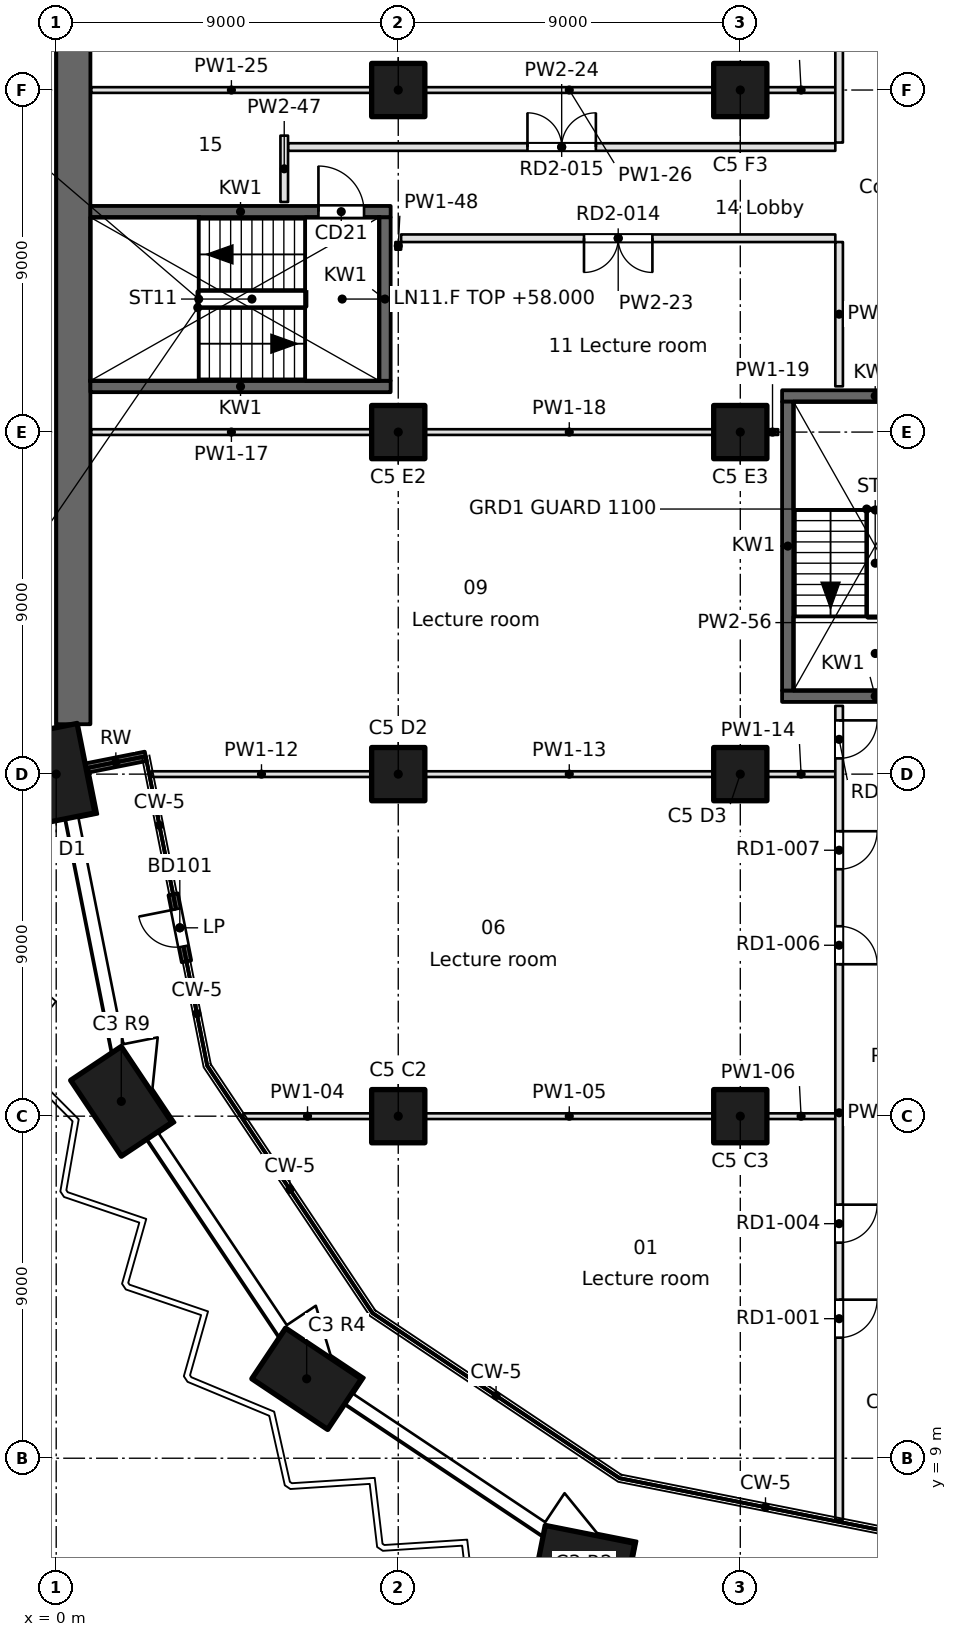
"""IFC4 building model, lengths in metres.
Left out: names, types, materials, properties, quantities, classifications, styles, units other than length and angle.
Written with IfcOpenShell. Run it as: python <this file> out.ifc"""

import sys

from ifc_helpers import new_model, si_unit, direction, frame, frame_2d, origin, origin_2d, place, context, subcontext, project, spatial, rectangle, extrude, element, fill, save


model = new_model("IFC4")
c1 = context("Model", 3, precision=1e-05, world=origin(), true_north=direction((0.0, 1.0)))
c2 = subcontext(c1, "Body", "Model", "MODEL_VIEW")
j1 = project(units=[si_unit("LENGTHUNIT", "METRE"), si_unit("PLANEANGLEUNIT", "RADIAN")], contexts=[c1])
p1 = place(None, origin())
s1 = spatial("IfcSite", under=j1, at=p1, CompositionType="ELEMENT")
p2 = place(p1, origin())
s2 = spatial("IfcBuilding", under=s1, at=p2, CompositionType="ELEMENT")
p3 = place(p2, frame((0.0, 0.0, 58.0)))
s3 = spatial("IfcBuildingStorey", under=s2, at=p3, CompositionType="ELEMENT", Elevation=58.0)
for number, where, z_axis, x_axis in (
    (1, (13.89, 6.213, 0.0), (0.0, 0.0, 1.0), (-0.981, 0.195, 0.0)),
    (2, (6.59, 11.09, 0.0), (0.0, 0.0, 1.0), (-0.831, 0.556, 0.0)),
    (3, (1.713, 18.39, 0.0), (0.0, 0.0, 1.0), (-0.556, 0.831, 0.0)),
    (4, (0.0, 27.0, 0.0), (0.0, 0.0, 1.0), (-0.195, 0.981, 0.0)),
):
    element("IfcColumn", number, at=place(p3, frame(where, z_axis=z_axis, x_axis=x_axis)), inside=s3, PredefinedType="COLUMN", context=c2, shape_type="SweptSolid", body=[
        extrude(rectangle(XDim=2.4, YDim=1.6, at=origin_2d()), origin(), (0.0, 0.0, 1.0), 3.7),
    ])
for number, where, z_axis, x_axis in (
    (5, (9.0, 18.0, 0.0), (0.0, 0.0, 1.0), (1.0, 0.0, 0.0)),
    (6, (9.0, 27.0, 0.0), (0.0, 0.0, 1.0), (1.0, 0.0, 0.0)),
    (7, (9.0, 36.0, 0.0), (0.0, 0.0, 1.0), (1.0, 0.0, 0.0)),
    (8, (9.0, 45.0, 0.0), (0.0, 0.0, 1.0), (1.0, 0.0, 0.0)),
    (9, (18.0, 18.0, 0.0), (0.0, 0.0, 1.0), (1.0, 0.0, 0.0)),
    (10, (18.0, 27.0, 0.0), (0.0, 0.0, 1.0), (1.0, 0.0, 0.0)),
    (11, (18.0, 36.0, 0.0), (0.0, 0.0, 1.0), (1.0, 0.0, 0.0)),
    (12, (18.0, 45.0, 0.0), (0.0, 0.0, 1.0), (1.0, 0.0, 0.0)),
):
    element("IfcColumn", number, at=place(p3, frame(where, z_axis=z_axis, x_axis=x_axis)), inside=s3, PredefinedType="COLUMN", context=c2, shape_type="SweptSolid", body=[
        extrude(rectangle(XDim=1.4, YDim=1.4, at=origin_2d()), origin(), (0.0, 0.0, 1.0), 3.7),
    ])
p4 = place(p3, frame((0.45, 94.5, 0.0), z_axis=(0.0, 0.0, 1.0), x_axis=(0.0, -1.0, 0.0)))
e13 = element("IfcWall", 13, at=p4, inside=s3, PredefinedType="SHEAR", context=c2, shape_type="SweptSolid", body=[
    extrude(rectangle(XDim=66.187, YDim=0.9, at=frame_2d((33.094, 0.0))), origin(), (0.0, 0.0, 1.0), 3.7),
])
p5 = place(p3, frame((0.784, 27.157, 0.0), z_axis=(0.0, 0.0, 1.0), x_axis=(0.980826234823, 0.19488431718, 0.0)))
e14 = element("IfcWall", 14, at=p5, inside=s3, PredefinedType="SOLIDWALL", context=c2, shape_type="SweptSolid", body=[
    extrude(rectangle(XDim=1.601, YDim=0.25, at=frame_2d((0.801, 0.0))), origin(), (0.0, 0.0, 1.0), 3.3),
])
p6 = place(p3, frame((3.077, 23.839, 0.0), z_axis=(0.0, 0.0, 1.0), x_axis=(0.195046569833, -0.980793982239, 0.0)))
e15 = element("IfcWall", 15, at=p6, inside=s3, PredefinedType="SOLIDWALL", context=c2, shape_type="SweptSolid", body=[
    extrude(rectangle(XDim=1.8, YDim=0.25, at=frame_2d((0.9, 0.0))), origin(), (0.0, 0.0, 1.0), 3.3),
])
p7 = place(p6, frame((0.4, 0.0, 0.0)))
e16 = element("IfcOpeningElement", 16, at=p7, cuts=e15, PredefinedType="OPENING", context=c2, shape_type="SweptSolid", body=[
    extrude(rectangle(XDim=1.0, YDim=2.1, at=frame_2d((0.5, 1.05))), frame((0.0, 0.125, 0.0), z_axis=(0.0, -1.0, 0.0), x_axis=(1.0, 0.0, 0.0)), (0.0, 0.0, 1.0), 0.25),
])
for number, where, z_axis, x_axis in (
    (17, (19.1, 29.05, -0.4), (0.0, 0.0, 1.0), (1.0, 0.0, 0.0)),
    (18, (19.1, 36.95, -0.4), (0.0, 0.0, 1.0), (1.0, 0.0, 0.0)),
):
    element("IfcWall", number, at=place(p3, frame(where, z_axis=z_axis, x_axis=x_axis)), inside=s3, PredefinedType="SOLIDWALL", context=c2, shape_type="SweptSolid", body=[
        extrude(rectangle(XDim=4.9, YDim=0.3, at=frame_2d((2.45, 0.0))), origin(), (0.0, 0.0, 1.0), 3.7),
    ])
p8 = place(p3, frame((0.9, 37.2, -0.4), z_axis=(0.0, 0.0, 1.0), x_axis=(1.0, 0.0, 0.0)))
e19 = element("IfcWall", 19, at=p8, inside=s3, PredefinedType="SOLIDWALL", context=c2, shape_type="SweptSolid", body=[
    extrude(rectangle(XDim=7.9, YDim=0.3, at=frame_2d((3.95, 0.0))), origin(), (0.0, 0.0, 1.0), 3.7),
])
p9 = place(p3, frame((0.9, 41.8, -0.4), z_axis=(0.0, 0.0, 1.0), x_axis=(1.0, 0.0, 0.0)))
e20 = element("IfcWall", 20, at=p9, inside=s3, PredefinedType="SOLIDWALL", context=c2, shape_type="SweptSolid", body=[
    extrude(rectangle(XDim=7.9, YDim=0.3, at=frame_2d((3.95, 0.0))), origin(), (0.0, 0.0, 1.0), 3.7),
])
p10 = place(p9, frame((6.0, 0.0, 0.4)))
e21 = element("IfcOpeningElement", 21, at=p10, cuts=e20, PredefinedType="OPENING", context=c2, shape_type="SweptSolid", body=[
    extrude(rectangle(XDim=1.2, YDim=2.1, at=frame_2d((0.6, 1.05))), frame((0.0, 0.15, 0.0), z_axis=(0.0, -1.0, 0.0), x_axis=(1.0, 0.0, 0.0)), (0.0, 0.0, 1.0), 0.3),
])
p11 = place(p3, frame((8.65, 37.35, -0.4), z_axis=(0.0, 0.0, 1.0), x_axis=(0.0, 1.0, 0.0)))
e22 = element("IfcWall", 22, at=p11, inside=s3, PredefinedType="SOLIDWALL", context=c2, shape_type="SweptSolid", body=[
    extrude(rectangle(XDim=4.3, YDim=0.3, at=frame_2d((2.15, 0.0))), origin(), (0.0, 0.0, 1.0), 3.7),
])
p12 = place(p3, frame((19.25, 29.2, -0.4), z_axis=(0.0, 0.0, 1.0), x_axis=(0.0, 1.0, 0.0)))
e23 = element("IfcWall", 23, at=p12, inside=s3, PredefinedType="SOLIDWALL", context=c2, shape_type="SweptSolid", body=[
    extrude(rectangle(XDim=7.6, YDim=0.3, at=frame_2d((3.8, 0.0))), origin(), (0.0, 0.0, 1.0), 3.7),
])
p13 = place(p3, frame((4.926, 18.0, 0.0), z_axis=(0.0, 0.0, 1.0), x_axis=(1.0, 0.0, 0.0)))
e24 = element("IfcWall", 24, at=p13, inside=s3, PredefinedType="PARTITIONING", context=c2, shape_type="SweptSolid", body=[
    extrude(rectangle(XDim=3.375, YDim=0.15, at=frame_2d((1.687, 0.0))), origin(), (0.0, 0.0, 1.0), 3.3),
])
p14 = place(p3, frame((9.7, 18.0, 0.0), z_axis=(0.0, 0.0, 1.0), x_axis=(1.0, 0.0, 0.0)))
e25 = element("IfcWall", 25, at=p14, inside=s3, PredefinedType="PARTITIONING", context=c2, shape_type="SweptSolid", body=[
    extrude(rectangle(XDim=7.6, YDim=0.15, at=frame_2d((3.8, 0.0))), origin(), (0.0, 0.0, 1.0), 3.3),
])
p15 = place(p3, frame((18.7, 18.0, 0.0), z_axis=(0.0, 0.0, 1.0), x_axis=(1.0, 0.0, 0.0)))
e26 = element("IfcWall", 26, at=p15, inside=s3, PredefinedType="PARTITIONING", context=c2, shape_type="SweptSolid", body=[
    extrude(rectangle(XDim=1.8, YDim=0.15, at=frame_2d((0.9, 0.0))), origin(), (0.0, 0.0, 1.0), 3.3),
])
p16 = place(p3, frame((2.503, 27.0, 0.0), z_axis=(0.0, 0.0, 1.0), x_axis=(1.0, 0.0, 0.0)))
e27 = element("IfcWall", 27, at=p16, inside=s3, PredefinedType="PARTITIONING", context=c2, shape_type="SweptSolid", body=[
    extrude(rectangle(XDim=5.797, YDim=0.15, at=frame_2d((2.898, 0.0))), origin(), (0.0, 0.0, 1.0), 3.3),
])
p17 = place(p3, frame((9.7, 27.0, 0.0), z_axis=(0.0, 0.0, 1.0), x_axis=(1.0, 0.0, 0.0)))
e28 = element("IfcWall", 28, at=p17, inside=s3, PredefinedType="PARTITIONING", context=c2, shape_type="SweptSolid", body=[
    extrude(rectangle(XDim=7.6, YDim=0.15, at=frame_2d((3.8, 0.0))), origin(), (0.0, 0.0, 1.0), 3.3),
])
p18 = place(p3, frame((18.7, 27.0, 0.0), z_axis=(0.0, 0.0, 1.0), x_axis=(1.0, 0.0, 0.0)))
e29 = element("IfcWall", 29, at=p18, inside=s3, PredefinedType="PARTITIONING", context=c2, shape_type="SweptSolid", body=[
    extrude(rectangle(XDim=1.8, YDim=0.15, at=frame_2d((0.9, 0.0))), origin(), (0.0, 0.0, 1.0), 3.3),
])
p19 = place(p3, frame((0.92, 36.0, 0.0), z_axis=(0.0, 0.0, 1.0), x_axis=(1.0, 0.0, 0.0)))
e30 = element("IfcWall", 30, at=p19, inside=s3, PredefinedType="PARTITIONING", context=c2, shape_type="SweptSolid", body=[
    extrude(rectangle(XDim=7.38, YDim=0.15, at=frame_2d((3.69, 0.0))), origin(), (0.0, 0.0, 1.0), 3.3),
])
p20 = place(p3, frame((9.7, 36.0, 0.0), z_axis=(0.0, 0.0, 1.0), x_axis=(1.0, 0.0, 0.0)))
e31 = element("IfcWall", 31, at=p20, inside=s3, PredefinedType="PARTITIONING", context=c2, shape_type="SweptSolid", body=[
    extrude(rectangle(XDim=7.6, YDim=0.15, at=frame_2d((3.8, 0.0))), origin(), (0.0, 0.0, 1.0), 3.3),
])
p21 = place(p3, frame((18.7, 36.0, 0.0), z_axis=(0.0, 0.0, 1.0), x_axis=(1.0, 0.0, 0.0)))
e32 = element("IfcWall", 32, at=p21, inside=s3, PredefinedType="PARTITIONING", context=c2, shape_type="SweptSolid", body=[
    extrude(rectangle(XDim=0.296, YDim=0.15, at=frame_2d((0.148, 0.0))), origin(), (0.0, 0.0, 1.0), 3.3),
])
p22 = place(p3, frame((20.5, 41.1, 0.0), z_axis=(0.0, 0.0, 1.0), x_axis=(-1.0, 0.0, 0.0)))
e33 = element("IfcWall", 33, at=p22, inside=s3, PredefinedType="PARTITIONING", context=c2, shape_type="SweptSolid", body=[
    extrude(rectangle(XDim=11.425, YDim=0.2, at=frame_2d((5.712, 0.0))), origin(), (0.0, 0.0, 1.0), 3.3),
])
p23 = place(p22, frame((4.812, 0.0, 0.0)))
e34 = element("IfcOpeningElement", 34, at=p23, cuts=e33, PredefinedType="OPENING", context=c2, shape_type="SweptSolid", body=[
    extrude(rectangle(XDim=1.8, YDim=2.1, at=frame_2d((0.9, 1.05))), frame((0.0, 0.1, 0.0), z_axis=(0.0, -1.0, 0.0), x_axis=(1.0, 0.0, 0.0)), (0.0, 0.0, 1.0), 0.2),
])
p24 = place(p3, frame((6.1, 43.5, 0.0), z_axis=(0.0, 0.0, 1.0), x_axis=(1.0, 0.0, 0.0)))
e35 = element("IfcWall", 35, at=p24, inside=s3, PredefinedType="PARTITIONING", context=c2, shape_type="SweptSolid", body=[
    extrude(rectangle(XDim=14.4, YDim=0.2, at=frame_2d((7.2, 0.0))), origin(), (0.0, 0.0, 1.0), 3.3),
])
p25 = place(p24, frame((6.3, 0.0, 0.0)))
e36 = element("IfcOpeningElement", 36, at=p25, cuts=e35, PredefinedType="OPENING", context=c2, shape_type="SweptSolid", body=[
    extrude(rectangle(XDim=1.8, YDim=2.1, at=frame_2d((0.9, 1.05))), frame((0.0, 0.1, 0.0), z_axis=(0.0, -1.0, 0.0), x_axis=(1.0, 0.0, 0.0)), (0.0, 0.0, 1.0), 0.2),
])
p26 = place(p3, frame((0.92, 45.0, 0.0), z_axis=(0.0, 0.0, 1.0), x_axis=(1.0, 0.0, 0.0)))
e37 = element("IfcWall", 37, at=p26, inside=s3, PredefinedType="PARTITIONING", context=c2, shape_type="SweptSolid", body=[
    extrude(rectangle(XDim=7.38, YDim=0.15, at=frame_2d((3.69, 0.0))), origin(), (0.0, 0.0, 1.0), 3.3),
])
p27 = place(p3, frame((9.7, 45.0, 0.0), z_axis=(0.0, 0.0, 1.0), x_axis=(1.0, 0.0, 0.0)))
e38 = element("IfcWall", 38, at=p27, inside=s3, PredefinedType="PARTITIONING", context=c2, shape_type="SweptSolid", body=[
    extrude(rectangle(XDim=7.6, YDim=0.15, at=frame_2d((3.8, 0.0))), origin(), (0.0, 0.0, 1.0), 3.3),
])
p28 = place(p3, frame((18.7, 45.0, 0.0), z_axis=(0.0, 0.0, 1.0), x_axis=(1.0, 0.0, 0.0)))
e39 = element("IfcWall", 39, at=p28, inside=s3, PredefinedType="PARTITIONING", context=c2, shape_type="SweptSolid", body=[
    extrude(rectangle(XDim=1.8, YDim=0.15, at=frame_2d((0.9, 0.0))), origin(), (0.0, 0.0, 1.0), 3.3),
])
p29 = place(p3, frame((6.0, 42.054, 0.0), z_axis=(0.0, 0.0, 1.0), x_axis=(0.0, 1.0, 0.0)))
e40 = element("IfcWall", 40, at=p29, inside=s3, PredefinedType="PARTITIONING", context=c2, shape_type="SweptSolid", body=[
    extrude(rectangle(XDim=1.746, YDim=0.2, at=frame_2d((0.873, 0.0))), origin(), (0.0, 0.0, 1.0), 3.3),
])
p30 = place(p3, frame((9.0, 41.0, 0.0), z_axis=(0.0, 0.0, 1.0), x_axis=(0.0, -1.0, 0.0)))
e41 = element("IfcWall", 41, at=p30, inside=s3, PredefinedType="PARTITIONING", context=c2, shape_type="SweptSolid", body=[
    extrude(rectangle(XDim=0.2, YDim=0.15, at=frame_2d((0.1, 0.0))), origin(), (0.0, 0.0, 1.0), 3.3),
])
p31 = place(p3, frame((20.6, 7.381, 0.0), z_axis=(0.0, 0.0, 1.0), x_axis=(0.0, 1.0, 0.0)))
e42 = element("IfcWall", 42, at=p31, inside=s3, PredefinedType="PARTITIONING", context=c2, shape_type="SweptSolid", body=[
    extrude(rectangle(XDim=21.415, YDim=0.2, at=frame_2d((10.708, 0.0))), origin(), (0.0, 0.0, 1.0), 3.3),
])
p32 = place(p31, frame((4.791, 0.0, 0.0)))
e43 = element("IfcOpeningElement", 43, at=p32, cuts=e42, PredefinedType="OPENING", context=c2, shape_type="SweptSolid", body=[
    extrude(rectangle(XDim=1.0, YDim=2.1, at=frame_2d((0.5, 1.05))), frame((0.0, 0.1, 0.0), z_axis=(0.0, -1.0, 0.0), x_axis=(1.0, 0.0, 0.0)), (0.0, 0.0, 1.0), 0.2),
])
p33 = place(p31, frame((7.291, 0.0, 0.0)))
e44 = element("IfcOpeningElement", 44, at=p33, cuts=e42, PredefinedType="OPENING", context=c2, shape_type="SweptSolid", body=[
    extrude(rectangle(XDim=1.0, YDim=2.1, at=frame_2d((0.5, 1.05))), frame((0.0, 0.1, 0.0), z_axis=(0.0, -1.0, 0.0), x_axis=(1.0, 0.0, 0.0)), (0.0, 0.0, 1.0), 0.2),
])
p34 = place(p31, frame((14.616, 0.0, 0.0)))
e45 = element("IfcOpeningElement", 45, at=p34, cuts=e42, PredefinedType="OPENING", context=c2, shape_type="SweptSolid", body=[
    extrude(rectangle(XDim=1.0, YDim=2.1, at=frame_2d((0.5, 1.05))), frame((0.0, 0.1, 0.0), z_axis=(0.0, -1.0, 0.0), x_axis=(1.0, 0.0, 0.0)), (0.0, 0.0, 1.0), 0.2),
])
p35 = place(p31, frame((17.116, 0.0, 0.0)))
e46 = element("IfcOpeningElement", 46, at=p35, cuts=e42, PredefinedType="OPENING", context=c2, shape_type="SweptSolid", body=[
    extrude(rectangle(XDim=1.0, YDim=2.1, at=frame_2d((0.5, 1.05))), frame((0.0, 0.1, 0.0), z_axis=(0.0, -1.0, 0.0), x_axis=(1.0, 0.0, 0.0)), (0.0, 0.0, 1.0), 0.2),
])
p36 = place(p31, frame((20.033, 0.0, 0.0)))
e47 = element("IfcOpeningElement", 47, at=p36, cuts=e42, PredefinedType="OPENING", context=c2, shape_type="SweptSolid", body=[
    extrude(rectangle(XDim=1.0, YDim=2.1, at=frame_2d((0.5, 1.05))), frame((0.0, 0.1, 0.0), z_axis=(0.0, -1.0, 0.0), x_axis=(1.0, 0.0, 0.0)), (0.0, 0.0, 1.0), 0.2),
])
p37 = place(p3, frame((20.6, 37.204, 0.0), z_axis=(0.0, 0.0, 1.0), x_axis=(0.0, 1.0, 0.0)))
e48 = element("IfcWall", 48, at=p37, inside=s3, PredefinedType="PARTITIONING", context=c2, shape_type="SweptSolid", body=[
    extrude(rectangle(XDim=3.796, YDim=0.2, at=frame_2d((1.898, 0.0))), origin(), (0.0, 0.0, 1.0), 3.3),
])
p38 = place(p3, frame((20.6, 43.618, 0.0), z_axis=(0.0, 0.0, 1.0), x_axis=(0.0, 1.0, 0.0)))
e49 = element("IfcWall", 49, at=p38, inside=s3, PredefinedType="PARTITIONING", context=c2, shape_type="SweptSolid", body=[
    extrude(rectangle(XDim=16.182, YDim=0.2, at=frame_2d((8.091, 0.0))), origin(), (0.0, 0.0, 1.0), 3.3),
])
p39 = place(p38, frame((8.223, 0.0, 0.0)))
e50 = element("IfcOpeningElement", 50, at=p39, cuts=e49, PredefinedType="OPENING", context=c2, shape_type="SweptSolid", body=[
    extrude(rectangle(XDim=1.0, YDim=2.1, at=frame_2d((0.5, 1.05))), frame((0.0, 0.1, 0.0), z_axis=(0.0, -1.0, 0.0), x_axis=(1.0, 0.0, 0.0)), (0.0, 0.0, 1.0), 0.2),
])
p40 = place(p38, frame((10.723, 0.0, 0.0)))
e51 = element("IfcOpeningElement", 51, at=p40, cuts=e49, PredefinedType="OPENING", context=c2, shape_type="SweptSolid", body=[
    extrude(rectangle(XDim=1.0, YDim=2.1, at=frame_2d((0.5, 1.05))), frame((0.0, 0.1, 0.0), z_axis=(0.0, -1.0, 0.0), x_axis=(1.0, 0.0, 0.0)), (0.0, 0.0, 1.0), 0.2),
])
p41 = place(p7, frame((1.0, 0.0, 0.0), z_axis=(0.0, 0.0, 1.0), x_axis=(-1.0, 0.0, 0.0)))
e52 = element("IfcDoor", 52, at=p41, inside=s3, OperationType="SINGLE_SWING_RIGHT", PredefinedType="DOOR", context=c2, shape_type="SweptSolid", body=[
    extrude(rectangle(XDim=1.0, YDim=2.1, at=frame_2d((0.5, 1.05))), frame((0.0, 0.025, 0.0), z_axis=(0.0, -1.0, 0.0), x_axis=(1.0, 0.0, 0.0)), (0.0, 0.0, 1.0), 0.05),
])
fill(e16, e52)
p42 = place(p10, origin())
e53 = element("IfcDoor", 53, at=p42, inside=s3, OperationType="SINGLE_SWING_LEFT", PredefinedType="DOOR", context=c2, shape_type="SweptSolid", body=[
    extrude(rectangle(XDim=1.2, YDim=2.1, at=frame_2d((0.6, 1.05))), frame((0.0, 0.025, 0.0), z_axis=(0.0, -1.0, 0.0), x_axis=(1.0, 0.0, 0.0)), (0.0, 0.0, 1.0), 0.05),
])
fill(e21, e53)
p43 = place(p32, frame((1.0, 0.0, 0.0), z_axis=(0.0, 0.0, 1.0), x_axis=(-1.0, 0.0, 0.0)))
e54 = element("IfcDoor", 54, at=p43, inside=s3, OperationType="SINGLE_SWING_LEFT", PredefinedType="DOOR", context=c2, shape_type="SweptSolid", body=[
    extrude(rectangle(XDim=1.0, YDim=2.1, at=frame_2d((0.5, 1.05))), frame((0.0, 0.025, 0.0), z_axis=(0.0, -1.0, 0.0), x_axis=(1.0, 0.0, 0.0)), (0.0, 0.0, 1.0), 0.05),
])
fill(e43, e54)
p44 = place(p33, frame((1.0, 0.0, 0.0), z_axis=(0.0, 0.0, 1.0), x_axis=(-1.0, 0.0, 0.0)))
e55 = element("IfcDoor", 55, at=p44, inside=s3, OperationType="SINGLE_SWING_LEFT", PredefinedType="DOOR", context=c2, shape_type="SweptSolid", body=[
    extrude(rectangle(XDim=1.0, YDim=2.1, at=frame_2d((0.5, 1.05))), frame((0.0, 0.025, 0.0), z_axis=(0.0, -1.0, 0.0), x_axis=(1.0, 0.0, 0.0)), (0.0, 0.0, 1.0), 0.05),
])
fill(e44, e55)
p45 = place(p34, frame((1.0, 0.0, 0.0), z_axis=(0.0, 0.0, 1.0), x_axis=(-1.0, 0.0, 0.0)))
e56 = element("IfcDoor", 56, at=p45, inside=s3, OperationType="SINGLE_SWING_RIGHT", PredefinedType="DOOR", context=c2, shape_type="SweptSolid", body=[
    extrude(rectangle(XDim=1.0, YDim=2.1, at=frame_2d((0.5, 1.05))), frame((0.0, 0.025, 0.0), z_axis=(0.0, -1.0, 0.0), x_axis=(1.0, 0.0, 0.0)), (0.0, 0.0, 1.0), 0.05),
])
fill(e45, e56)
p46 = place(p35, frame((1.0, 0.0, 0.0), z_axis=(0.0, 0.0, 1.0), x_axis=(-1.0, 0.0, 0.0)))
e57 = element("IfcDoor", 57, at=p46, inside=s3, OperationType="SINGLE_SWING_LEFT", PredefinedType="DOOR", context=c2, shape_type="SweptSolid", body=[
    extrude(rectangle(XDim=1.0, YDim=2.1, at=frame_2d((0.5, 1.05))), frame((0.0, 0.025, 0.0), z_axis=(0.0, -1.0, 0.0), x_axis=(1.0, 0.0, 0.0)), (0.0, 0.0, 1.0), 0.05),
])
fill(e46, e57)
p47 = place(p36, frame((1.0, 0.0, 0.0), z_axis=(0.0, 0.0, 1.0), x_axis=(-1.0, 0.0, 0.0)))
e58 = element("IfcDoor", 58, at=p47, inside=s3, OperationType="SINGLE_SWING_LEFT", PredefinedType="DOOR", context=c2, shape_type="SweptSolid", body=[
    extrude(rectangle(XDim=1.0, YDim=2.1, at=frame_2d((0.5, 1.05))), frame((0.0, 0.025, 0.0), z_axis=(0.0, -1.0, 0.0), x_axis=(1.0, 0.0, 0.0)), (0.0, 0.0, 1.0), 0.05),
])
fill(e47, e58)
p48 = place(p23, origin())
e59 = element("IfcDoor", 59, at=p48, inside=s3, OperationType="DOUBLE_DOOR_SINGLE_SWING", PredefinedType="DOOR", context=c2, shape_type="SweptSolid", body=[
    extrude(rectangle(XDim=1.8, YDim=2.1, at=frame_2d((0.9, 1.05))), frame((0.0, 0.025, 0.0), z_axis=(0.0, -1.0, 0.0), x_axis=(1.0, 0.0, 0.0)), (0.0, 0.0, 1.0), 0.05),
])
fill(e34, e59)
p49 = place(p25, origin())
e60 = element("IfcDoor", 60, at=p49, inside=s3, OperationType="DOUBLE_DOOR_SINGLE_SWING", PredefinedType="DOOR", context=c2, shape_type="SweptSolid", body=[
    extrude(rectangle(XDim=1.8, YDim=2.1, at=frame_2d((0.9, 1.05))), frame((0.0, 0.025, 0.0), z_axis=(0.0, -1.0, 0.0), x_axis=(1.0, 0.0, 0.0)), (0.0, 0.0, 1.0), 0.05),
])
fill(e36, e60)
save(model, sys.argv[1])
